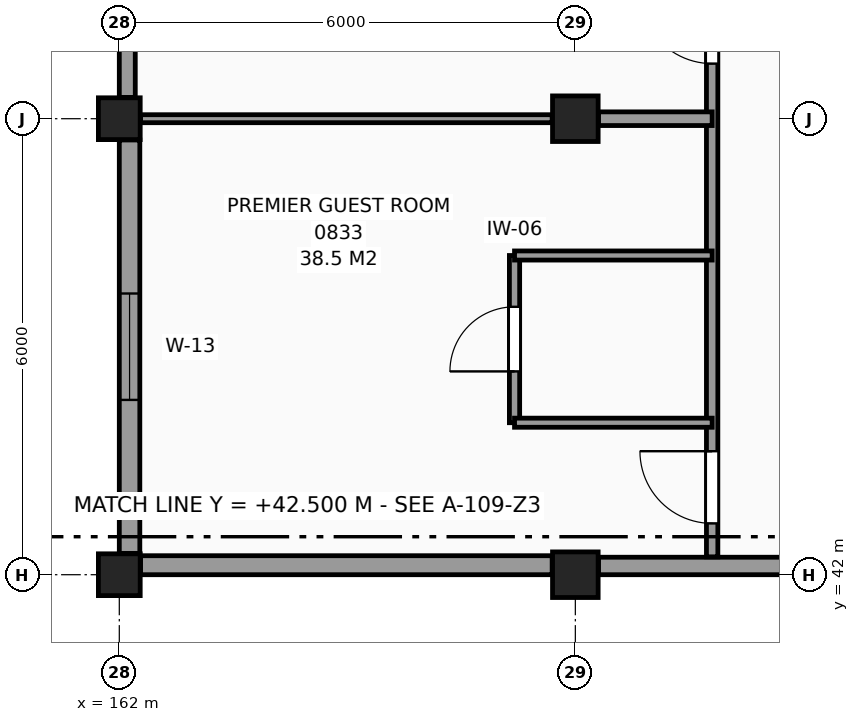
"""IFC4 building model, lengths in metres.
Left out: names, types, materials, properties, quantities, classifications, styles, units other than length and angle.
Written with IfcOpenShell. Run it as: python <this file> out.ifc"""

import sys

from ifc_helpers import new_model, si_unit, direction, frame, frame_2d, origin, origin_2d, place, context, subcontext, project, spatial, rectangle, extrude, element, fill, save


model = new_model("IFC4")
c1 = context("Model", 3, precision=1e-05, world=origin(), true_north=direction((0.0, 1.0)))
c2 = subcontext(c1, "Body", "Model", "MODEL_VIEW")
j1 = project(units=[si_unit("LENGTHUNIT", "METRE"), si_unit("PLANEANGLEUNIT", "RADIAN")], contexts=[c1])
p1 = place(None, origin())
s1 = spatial("IfcSite", under=j1, at=p1, CompositionType="ELEMENT")
p2 = place(p1, origin())
s2 = spatial("IfcBuilding", under=s1, at=p2, CompositionType="ELEMENT")
p3 = place(p2, frame((0.0, 0.0, 34.8)))
s3 = spatial("IfcBuildingStorey", under=s2, at=p3, CompositionType="ELEMENT", Elevation=34.8)
for number, where, z_axis, x_axis in (
    (1, (162.0, 42.0, 0.0), (0.0, 0.0, 1.0), (1.0, 0.0, 0.0)),
    (2, (162.0, 48.0, 0.0), (0.0, 0.0, 1.0), (1.0, 0.0, 0.0)),
):
    element("IfcColumn", number, at=place(p3, frame(where, z_axis=z_axis, x_axis=x_axis)), inside=s3, PredefinedType="COLUMN", context=c2, shape_type="SweptSolid", body=[
        extrude(rectangle(XDim=0.55, YDim=0.55, at=origin_2d()), origin(), (0.0, 0.0, 1.0), 3.3),
    ])
for number, where, z_axis, x_axis in (
    (3, (168.0, 42.0, 0.0), (0.0, 0.0, 1.0), (1.0, 0.0, 0.0)),
    (4, (168.0, 48.0, 0.0), (0.0, 0.0, 1.0), (1.0, 0.0, 0.0)),
):
    element("IfcColumn", number, at=place(p3, frame(where, z_axis=z_axis, x_axis=x_axis)), inside=s3, PredefinedType="COLUMN", context=c2, shape_type="SweptSolid", body=[
        extrude(rectangle(XDim=0.6, YDim=0.6, at=origin_2d()), origin(), (0.0, 0.0, 1.0), 3.3),
    ])
p4 = place(p3, frame((162.105, 53.72, 0.0), z_axis=(0.0, 0.0, 1.0), x_axis=(0.0, -1.0, 0.0)))
e5 = element("IfcWall", 5, at=p4, inside=s3, PredefinedType="SOLIDWALL", context=c2, shape_type="SweptSolid", body=[
    extrude(rectangle(XDim=5.44, YDim=0.21, at=frame_2d((2.72, 0.0))), origin(), (0.0, 0.0, 1.0), 2.42),
])
p5 = place(p4, frame((2.02, 0.0, 0.8)))
e6 = element("IfcOpeningElement", 6, at=p5, cuts=e5, PredefinedType="OPENING", context=c2, shape_type="SweptSolid", body=[
    extrude(rectangle(XDim=1.4, YDim=1.4, at=frame_2d((0.7, 0.7))), frame((0.0, 0.115, 0.0), z_axis=(0.0, -1.0, 0.0), x_axis=(1.0, 0.0, 0.0)), (0.0, 0.0, 1.0), 0.23),
])
p6 = place(p3, frame((162.135, 47.72, 0.0), z_axis=(0.0, 0.0, 1.0), x_axis=(0.0, -1.0, 0.0)))
e7 = element("IfcWall", 7, at=p6, inside=s3, PredefinedType="SOLIDWALL", context=c2, shape_type="SweptSolid", body=[
    extrude(rectangle(XDim=5.44, YDim=0.27, at=frame_2d((2.72, 0.0))), origin(), (0.0, 0.0, 1.0), 2.42),
])
p7 = place(p6, frame((2.02, 0.0, 0.8)))
e8 = element("IfcOpeningElement", 8, at=p7, cuts=e7, PredefinedType="OPENING", context=c2, shape_type="SweptSolid", body=[
    extrude(rectangle(XDim=1.4, YDim=1.4, at=frame_2d((0.7, 0.7))), frame((0.0, 0.145, 0.0), z_axis=(0.0, -1.0, 0.0), x_axis=(1.0, 0.0, 0.0)), (0.0, 0.0, 1.0), 0.29),
])
p8 = place(p3, frame((162.28, 42.125, 0.0), z_axis=(0.0, 0.0, 1.0), x_axis=(1.0, 0.0, 0.0)))
e9 = element("IfcWall", 9, at=p8, inside=s3, PredefinedType="SOLIDWALL", context=c2, shape_type="SweptSolid", body=[
    extrude(rectangle(XDim=5.415, YDim=0.25, at=frame_2d((2.708, 0.0))), origin(), (0.0, 0.0, 1.0), 2.27),
])
p9 = place(p3, frame((168.305, 42.115, 0.0), z_axis=(0.0, 0.0, 1.0), x_axis=(1.0, 0.0, 0.0)))
e10 = element("IfcWall", 10, at=p9, inside=s3, PredefinedType="SOLIDWALL", context=c2, shape_type="SweptSolid", body=[
    extrude(rectangle(XDim=5.415, YDim=0.23, at=frame_2d((2.708, 0.0))), origin(), (0.0, 0.0, 1.0), 2.27),
])
p10 = place(p3, frame((167.2, 44.0, 0.0), z_axis=(0.0, 0.0, 1.0), x_axis=(0.0, 1.0, 0.0)))
e11 = element("IfcWall", 11, at=p10, inside=s3, PredefinedType="PARTITIONING", context=c2, shape_type="SweptSolid", body=[
    extrude(rectangle(XDim=2.2, YDim=0.135, at=frame_2d((1.1, 0.0))), origin(), (0.0, 0.0, 1.0), 3.07),
])
p11 = place(p10, frame((0.675, 0.0, 0.0)))
e12 = element("IfcOpeningElement", 12, at=p11, cuts=e11, PredefinedType="OPENING", context=c2, shape_type="SweptSolid", body=[
    extrude(rectangle(XDim=0.85, YDim=2.1, at=frame_2d((0.425, 1.05))), frame((0.0, 0.078, 0.0), z_axis=(0.0, -1.0, 0.0), x_axis=(1.0, 0.0, 0.0)), (0.0, 0.0, 1.0), 0.155),
])
p12 = place(p3, frame((169.8, 42.235, 0.0), z_axis=(0.0, 0.0, 1.0), x_axis=(0.0, 1.0, 0.0)))
e13 = element("IfcWall", 13, at=p12, inside=s3, PredefinedType="PARTITIONING", context=c2, shape_type="SweptSolid", body=[
    extrude(rectangle(XDim=65.585, YDim=0.15, at=frame_2d((32.792, 0.0))), origin(), (0.0, 0.0, 1.0), 3.07),
])
p13 = place(p12, frame((50.165, 0.0, 0.0)))
e14 = element("IfcOpeningElement", 14, at=p13, cuts=e13, PredefinedType="OPENING", context=c2, shape_type="SweptSolid", body=[
    extrude(rectangle(XDim=1.2, YDim=2.2, at=frame_2d((0.6, 1.1))), frame((0.0, 0.085, 0.0), z_axis=(0.0, -1.0, 0.0), x_axis=(1.0, 0.0, 0.0)), (0.0, 0.0, 1.0), 0.17),
])
p14 = place(p12, frame((0.44, 0.0, 0.0)))
e15 = element("IfcOpeningElement", 15, at=p14, cuts=e13, PredefinedType="OPENING", context=c2, shape_type="SweptSolid", body=[
    extrude(rectangle(XDim=0.95, YDim=2.1, at=frame_2d((0.475, 1.05))), frame((0.0, 0.085, 0.0), z_axis=(0.0, -1.0, 0.0), x_axis=(1.0, 0.0, 0.0)), (0.0, 0.0, 1.0), 0.17),
])
p15 = place(p12, frame((6.49, 0.0, 0.0)))
e16 = element("IfcOpeningElement", 16, at=p15, cuts=e13, PredefinedType="OPENING", context=c2, shape_type="SweptSolid", body=[
    extrude(rectangle(XDim=0.95, YDim=2.1, at=frame_2d((0.475, 1.05))), frame((0.0, 0.085, 0.0), z_axis=(0.0, -1.0, 0.0), x_axis=(1.0, 0.0, 0.0)), (0.0, 0.0, 1.0), 0.17),
])
p16 = place(p12, frame((12.49, 0.0, 0.0)))
e17 = element("IfcOpeningElement", 17, at=p16, cuts=e13, PredefinedType="OPENING", context=c2, shape_type="SweptSolid", body=[
    extrude(rectangle(XDim=0.95, YDim=2.1, at=frame_2d((0.475, 1.05))), frame((0.0, 0.085, 0.0), z_axis=(0.0, -1.0, 0.0), x_axis=(1.0, 0.0, 0.0)), (0.0, 0.0, 1.0), 0.17),
])
p17 = place(p12, frame((18.49, 0.0, 0.0)))
e18 = element("IfcOpeningElement", 18, at=p17, cuts=e13, PredefinedType="OPENING", context=c2, shape_type="SweptSolid", body=[
    extrude(rectangle(XDim=0.95, YDim=2.1, at=frame_2d((0.475, 1.05))), frame((0.0, 0.085, 0.0), z_axis=(0.0, -1.0, 0.0), x_axis=(1.0, 0.0, 0.0)), (0.0, 0.0, 1.0), 0.17),
])
p18 = place(p12, frame((24.49, 0.0, 0.0)))
e19 = element("IfcOpeningElement", 19, at=p18, cuts=e13, PredefinedType="OPENING", context=c2, shape_type="SweptSolid", body=[
    extrude(rectangle(XDim=0.95, YDim=2.1, at=frame_2d((0.475, 1.05))), frame((0.0, 0.085, 0.0), z_axis=(0.0, -1.0, 0.0), x_axis=(1.0, 0.0, 0.0)), (0.0, 0.0, 1.0), 0.17),
])
p19 = place(p12, frame((30.49, 0.0, 0.0)))
e20 = element("IfcOpeningElement", 20, at=p19, cuts=e13, PredefinedType="OPENING", context=c2, shape_type="SweptSolid", body=[
    extrude(rectangle(XDim=0.95, YDim=2.1, at=frame_2d((0.475, 1.05))), frame((0.0, 0.085, 0.0), z_axis=(0.0, -1.0, 0.0), x_axis=(1.0, 0.0, 0.0)), (0.0, 0.0, 1.0), 0.17),
])
p20 = place(p12, frame((54.49, 0.0, 0.0)))
e21 = element("IfcOpeningElement", 21, at=p20, cuts=e13, PredefinedType="OPENING", context=c2, shape_type="SweptSolid", body=[
    extrude(rectangle(XDim=0.95, YDim=2.1, at=frame_2d((0.475, 1.05))), frame((0.0, 0.085, 0.0), z_axis=(0.0, -1.0, 0.0), x_axis=(1.0, 0.0, 0.0)), (0.0, 0.0, 1.0), 0.17),
])
p21 = place(p12, frame((60.49, 0.0, 0.0)))
e22 = element("IfcOpeningElement", 22, at=p21, cuts=e13, PredefinedType="OPENING", context=c2, shape_type="SweptSolid", body=[
    extrude(rectangle(XDim=0.95, YDim=2.1, at=frame_2d((0.475, 1.05))), frame((0.0, 0.085, 0.0), z_axis=(0.0, -1.0, 0.0), x_axis=(1.0, 0.0, 0.0)), (0.0, 0.0, 1.0), 0.17),
])
for number, where, z_axis, x_axis in (
    (23, (167.2, 44.0, 0.0), (0.0, 0.0, 1.0), (1.0, 0.0, 0.0)),
    (24, (167.2, 46.2, 0.0), (0.0, 0.0, 1.0), (1.0, 0.0, 0.0)),
):
    element("IfcWall", number, at=place(p3, frame(where, z_axis=z_axis, x_axis=x_axis)), inside=s3, PredefinedType="PARTITIONING", context=c2, shape_type="SweptSolid", body=[
        extrude(rectangle(XDim=2.6, YDim=0.12, at=frame_2d((1.3, 0.0))), origin(), (0.0, 0.0, 1.0), 3.07),
    ])
p22 = place(p3, frame((162.28, 48.0, 0.0), z_axis=(0.0, 0.0, 1.0), x_axis=(1.0, 0.0, 0.0)))
e25 = element("IfcWall", 25, at=p22, inside=s3, PredefinedType="PARTITIONING", context=c2, shape_type="SweptSolid", body=[
    extrude(rectangle(XDim=5.415, YDim=0.105, at=frame_2d((2.708, 0.0))), origin(), (0.0, 0.0, 1.0), 2.37),
])
p23 = place(p3, frame((168.305, 48.0, 0.0), z_axis=(0.0, 0.0, 1.0), x_axis=(1.0, 0.0, 0.0)))
e26 = element("IfcWall", 26, at=p23, inside=s3, PredefinedType="PARTITIONING", context=c2, shape_type="SweptSolid", body=[
    extrude(rectangle(XDim=1.495, YDim=0.18, at=frame_2d((0.748, 0.0))), origin(), (0.0, 0.0, 1.0), 2.47),
])
p24 = place(p7, origin())
e27 = element("IfcWindow", 27, at=p24, inside=s3, PartitioningType="SINGLE_PANEL", PredefinedType="WINDOW", context=c2, shape_type="SweptSolid", body=[
    extrude(rectangle(XDim=1.4, YDim=1.4, at=frame_2d((0.7, 0.7))), frame((0.0, 0.03, 0.0), z_axis=(0.0, -1.0, 0.0), x_axis=(1.0, 0.0, 0.0)), (0.0, 0.0, 1.0), 0.06),
])
fill(e8, e27)
p25 = place(p11, origin())
e28 = element("IfcDoor", 28, at=p25, inside=s3, OperationType="SINGLE_SWING_LEFT", PredefinedType="DOOR", context=c2, shape_type="SweptSolid", body=[
    extrude(rectangle(XDim=0.85, YDim=2.1, at=frame_2d((0.425, 1.05))), frame((0.0, 0.025, 0.0), z_axis=(0.0, -1.0, 0.0), x_axis=(1.0, 0.0, 0.0)), (0.0, 0.0, 1.0), 0.05),
])
fill(e12, e28)
p26 = place(p14, origin())
e29 = element("IfcDoor", 29, at=p26, inside=s3, OperationType="SINGLE_SWING_RIGHT", PredefinedType="DOOR", context=c2, shape_type="SweptSolid", body=[
    extrude(rectangle(XDim=0.95, YDim=2.1, at=frame_2d((0.475, 1.05))), frame((0.0, 0.025, 0.0), z_axis=(0.0, -1.0, 0.0), x_axis=(1.0, 0.0, 0.0)), (0.0, 0.0, 1.0), 0.05),
])
fill(e15, e29)
p27 = place(p15, origin())
e30 = element("IfcDoor", 30, at=p27, inside=s3, OperationType="SINGLE_SWING_RIGHT", PredefinedType="DOOR", context=c2, shape_type="SweptSolid", body=[
    extrude(rectangle(XDim=0.95, YDim=2.1, at=frame_2d((0.475, 1.05))), frame((0.0, 0.025, 0.0), z_axis=(0.0, -1.0, 0.0), x_axis=(1.0, 0.0, 0.0)), (0.0, 0.0, 1.0), 0.05),
])
fill(e16, e30)
save(model, sys.argv[1])
